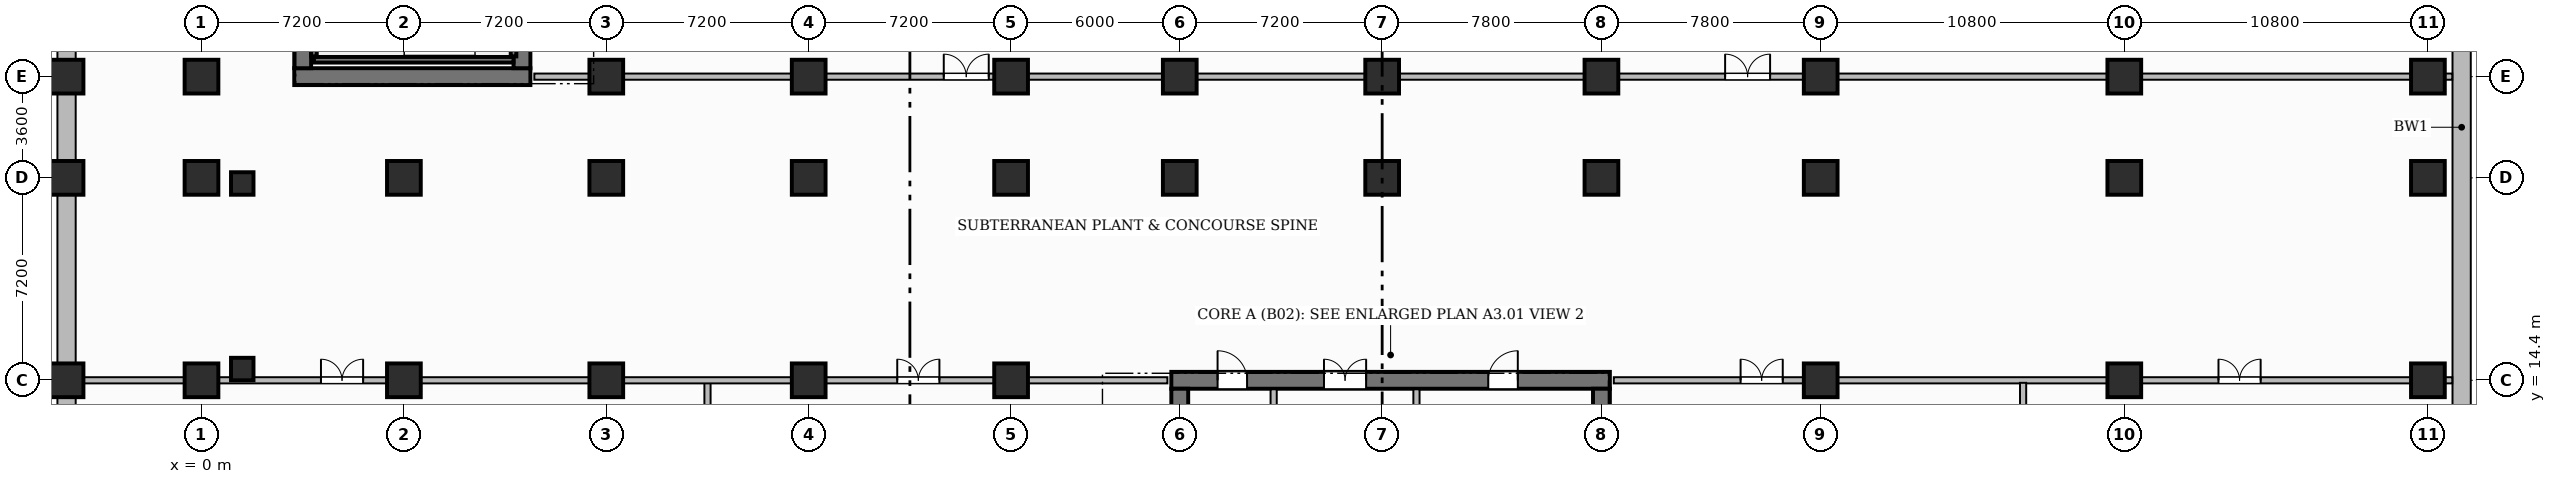
"""IFC4 building model, lengths in metres.
Left out: names, types, materials, properties, quantities, classifications, styles, units other than length and angle.
Written with IfcOpenShell. Run it as: python <this file> out.ifc"""

import sys

from ifc_helpers import new_model, si_unit, direction, frame, frame_2d, origin, origin_2d, place, context, subcontext, project, spatial, rectangle, extrude, source, transform, mapped, element, fill, save


model = new_model("IFC4")
c1 = context("Model", 3, precision=1e-05, world=origin(), true_north=direction((0.0, 1.0)))
c2 = subcontext(c1, "Body", "Model", "MODEL_VIEW")
j1 = project(units=[si_unit("LENGTHUNIT", "METRE"), si_unit("PLANEANGLEUNIT", "RADIAN")], contexts=[c1])
p1 = place(None, origin())
s1 = spatial("IfcSite", under=j1, at=p1, CompositionType="ELEMENT")
p2 = place(p1, origin())
s2 = spatial("IfcBuilding", under=s1, at=p2, CompositionType="ELEMENT")
p3 = place(p2, frame((0.0, 0.0, -13.0)))
s3 = spatial("IfcBuildingStorey", under=s2, at=p3, CompositionType="ELEMENT", Elevation=-13.0)
for number, where, z_axis, x_axis in (
    (1, (80.4, 0.35, -0.4), (0.0, 0.0, 1.0), (0.0, 1.0, 0.0)),
    (2, (-4.8, 46.45, -0.4), (0.0, 0.0, 1.0), (0.0, -1.0, 0.0)),
):
    element("IfcWall", number, at=place(p3, frame(where, z_axis=z_axis, x_axis=x_axis)), inside=s3, PredefinedType="USERDEFINED", context=c2, shape_type="SweptSolid", body=[
        extrude(rectangle(XDim=46.1, YDim=0.65, at=frame_2d((23.05, 0.0))), origin(), (0.0, 0.0, 1.0), 6.9),
    ])
p4 = place(p3, frame((34.5, 14.4, -0.4), z_axis=(0.0, 0.0, 1.0), x_axis=(1.0, 0.0, 0.0)))
e3 = element("IfcWall", 3, at=p4, inside=s3, PredefinedType="SHEAR", context=c2, shape_type="SweptSolid", body=[
    extrude(rectangle(XDim=15.6, YDim=0.6, at=frame_2d((7.8, 0.0))), origin(), (0.0, 0.0, 1.0), 6.9),
])
p5 = place(p4, frame((5.43, 0.0, 0.4)))
e4 = element("IfcOpeningElement", 4, at=p5, cuts=e3, PredefinedType="OPENING", context=c2, shape_type="SweptSolid", body=[
    extrude(rectangle(XDim=1.5, YDim=2.2, at=frame_2d((0.75, 1.1))), frame((0.0, 0.31, 0.0), z_axis=(0.0, -1.0, 0.0), x_axis=(1.0, 0.0, 0.0)), (0.0, 0.0, 1.0), 0.62),
])
p6 = place(p4, frame((1.645, 0.0, 0.4)))
e5 = element("IfcOpeningElement", 5, at=p6, cuts=e3, PredefinedType="OPENING", context=c2, shape_type="SweptSolid", body=[
    extrude(rectangle(XDim=1.05, YDim=2.15, at=frame_2d((0.525, 1.075))), frame((0.0, 0.31, 0.0), z_axis=(0.0, -1.0, 0.0), x_axis=(1.0, 0.0, 0.0)), (0.0, 0.0, 1.0), 0.62),
])
p7 = place(p4, frame((11.275, 0.0, 0.4)))
e6 = element("IfcOpeningElement", 6, at=p7, cuts=e3, PredefinedType="OPENING", context=c2, shape_type="SweptSolid", body=[
    extrude(rectangle(XDim=1.05, YDim=2.15, at=frame_2d((0.525, 1.075))), frame((0.0, 0.31, 0.0), z_axis=(0.0, -1.0, 0.0), x_axis=(1.0, 0.0, 0.0)), (0.0, 0.0, 1.0), 0.62),
])
for number, where, z_axis, x_axis in (
    (7, (34.8, 3.9, -0.4), (0.0, 0.0, 1.0), (0.0, 1.0, 0.0)),
    (8, (49.8, 3.9, -0.4), (0.0, 0.0, 1.0), (0.0, 1.0, 0.0)),
):
    element("IfcWall", number, at=place(p3, frame(where, z_axis=z_axis, x_axis=x_axis)), inside=s3, PredefinedType="SHEAR", context=c2, shape_type="SweptSolid", body=[
        extrude(rectangle(XDim=10.2, YDim=0.6, at=frame_2d((5.1, 0.0))), origin(), (0.0, 0.0, 1.0), 6.9),
    ])
p8 = place(p3, frame((3.3, 25.2, -0.4), z_axis=(0.0, 0.0, 1.0), x_axis=(1.0, 0.0, 0.0)))
e9 = element("IfcWall", 9, at=p8, inside=s3, PredefinedType="SHEAR", context=c2, shape_type="SweptSolid", body=[
    extrude(rectangle(XDim=8.4, YDim=0.6, at=frame_2d((4.2, 0.0))), origin(), (0.0, 0.0, 1.0), 6.9),
])
p9 = place(p3, frame((3.6, 25.5, -0.4), z_axis=(0.0, 0.0, 1.0), x_axis=(0.0, 1.0, 0.0)))
e10 = element("IfcWall", 10, at=p9, inside=s3, PredefinedType="SHEAR", context=c2, shape_type="SweptSolid", body=[
    extrude(rectangle(XDim=13.8, YDim=0.6, at=frame_2d((6.9, 0.0))), origin(), (0.0, 0.0, 1.0), 6.9),
])
p10 = place(p3, frame((11.4, 25.5, -0.4), z_axis=(0.0, 0.0, 1.0), x_axis=(0.0, 1.0, 0.0)))
e11 = element("IfcWall", 11, at=p10, inside=s3, PredefinedType="SHEAR", context=c2, shape_type="SweptSolid", body=[
    extrude(rectangle(XDim=13.8, YDim=0.6, at=frame_2d((6.9, 0.0))), origin(), (0.0, 0.0, 1.0), 6.9),
])
p11 = place(p10, frame((6.47, 0.0, 0.4)))
e12 = element("IfcOpeningElement", 12, at=p11, cuts=e11, PredefinedType="OPENING", context=c2, shape_type="SweptSolid", body=[
    extrude(rectangle(XDim=1.5, YDim=2.2, at=frame_2d((0.75, 1.1))), frame((0.0, 0.31, 0.0), z_axis=(0.0, -1.0, 0.0), x_axis=(1.0, 0.0, 0.0)), (0.0, 0.0, 1.0), 0.62),
])
m1 = source(origin(), c2, "Body", "SweptSolid", [
    extrude(rectangle(XDim=1.2, YDim=1.2, at=origin_2d()), origin(), (0.0, 0.0, 1.0), 6.9),
])
for number, where, z_axis, x_axis in (
    (13, (-4.8, 14.4, -0.4), (0.0, 0.0, 1.0), (1.0, 0.0, 0.0)),
    (14, (-4.8, 21.6, -0.4), (0.0, 0.0, 1.0), (1.0, 0.0, 0.0)),
    (15, (-4.8, 25.2, -0.4), (0.0, 0.0, 1.0), (1.0, 0.0, 0.0)),
    (16, (0.0, 14.4, -0.4), (0.0, 0.0, 1.0), (1.0, 0.0, 0.0)),
    (17, (0.0, 21.6, -0.4), (0.0, 0.0, 1.0), (1.0, 0.0, 0.0)),
    (18, (0.0, 25.2, -0.4), (0.0, 0.0, 1.0), (1.0, 0.0, 0.0)),
    (19, (7.2, 14.4, -0.4), (0.0, 0.0, 1.0), (1.0, 0.0, 0.0)),
    (20, (7.2, 21.6, -0.4), (0.0, 0.0, 1.0), (1.0, 0.0, 0.0)),
    (21, (14.4, 14.4, -0.4), (0.0, 0.0, 1.0), (1.0, 0.0, 0.0)),
    (22, (14.4, 21.6, -0.4), (0.0, 0.0, 1.0), (1.0, 0.0, 0.0)),
    (23, (14.4, 25.2, -0.4), (0.0, 0.0, 1.0), (1.0, 0.0, 0.0)),
    (24, (21.6, 14.4, -0.4), (0.0, 0.0, 1.0), (1.0, 0.0, 0.0)),
    (25, (21.6, 21.6, -0.4), (0.0, 0.0, 1.0), (1.0, 0.0, 0.0)),
    (26, (21.6, 25.2, -0.4), (0.0, 0.0, 1.0), (1.0, 0.0, 0.0)),
    (27, (28.8, 14.4, -0.4), (0.0, 0.0, 1.0), (1.0, 0.0, 0.0)),
    (28, (28.8, 21.6, -0.4), (0.0, 0.0, 1.0), (1.0, 0.0, 0.0)),
    (29, (28.8, 25.2, -0.4), (0.0, 0.0, 1.0), (1.0, 0.0, 0.0)),
    (30, (34.8, 21.6, -0.4), (0.0, 0.0, 1.0), (1.0, 0.0, 0.0)),
    (31, (34.8, 25.2, -0.4), (0.0, 0.0, 1.0), (1.0, 0.0, 0.0)),
    (32, (42.0, 21.6, -0.4), (0.0, 0.0, 1.0), (1.0, 0.0, 0.0)),
    (33, (42.0, 25.2, -0.4), (0.0, 0.0, 1.0), (1.0, 0.0, 0.0)),
    (34, (49.8, 21.6, -0.4), (0.0, 0.0, 1.0), (1.0, 0.0, 0.0)),
    (35, (49.8, 25.2, -0.4), (0.0, 0.0, 1.0), (1.0, 0.0, 0.0)),
    (36, (57.6, 14.4, -0.4), (0.0, 0.0, 1.0), (1.0, 0.0, 0.0)),
    (37, (57.6, 21.6, -0.4), (0.0, 0.0, 1.0), (1.0, 0.0, 0.0)),
    (38, (57.6, 25.2, -0.4), (0.0, 0.0, 1.0), (1.0, 0.0, 0.0)),
    (39, (68.4, 14.4, -0.4), (0.0, 0.0, 1.0), (1.0, 0.0, 0.0)),
    (40, (68.4, 21.6, -0.4), (0.0, 0.0, 1.0), (1.0, 0.0, 0.0)),
    (41, (68.4, 25.2, -0.4), (0.0, 0.0, 1.0), (1.0, 0.0, 0.0)),
    (42, (79.2, 14.4, -0.4), (0.0, 0.0, 1.0), (1.0, 0.0, 0.0)),
    (43, (79.2, 21.6, -0.4), (0.0, 0.0, 1.0), (1.0, 0.0, 0.0)),
    (44, (79.2, 25.2, -0.4), (0.0, 0.0, 1.0), (1.0, 0.0, 0.0)),
):
    element("IfcColumn", number, at=place(p3, frame(where, z_axis=z_axis, x_axis=x_axis)), inside=s3, PredefinedType="COLUMN", context=c2, shape_type="MappedRepresentation", body=[
        mapped(m1, transform((0.0, 0.0, 0.0), scale=1.0)),
    ])
m2 = source(origin(), c2, "Body", "SweptSolid", [
    extrude(rectangle(XDim=0.8, YDim=0.8, at=origin_2d()), origin(), (0.0, 0.0, 1.0), 6.9),
])
for number, where, z_axis, x_axis in (
    (45, (1.45, 14.8, -0.4), (0.0, 0.0, 1.0), (1.0, 0.0, 0.0)),
    (46, (1.45, 21.4, -0.4), (0.0, 0.0, 1.0), (1.0, 0.0, 0.0)),
):
    element("IfcColumn", number, at=place(p3, frame(where, z_axis=z_axis, x_axis=x_axis)), inside=s3, PredefinedType="COLUMN", context=c2, shape_type="MappedRepresentation", body=[
        mapped(m2, transform((0.0, 0.0, 0.0), scale=1.0)),
    ])
p12 = place(p3, frame((38.14, 11.22, 0.0), z_axis=(0.0, 0.0, 1.0), x_axis=(0.0, 1.0, 0.0)))
e47 = element("IfcWall", 47, at=p12, inside=s3, PredefinedType="PARTITIONING", context=c2, shape_type="SweptSolid", body=[
    extrude(rectangle(XDim=2.86, YDim=0.22, at=frame_2d((1.43, 0.0))), origin(), (0.0, 0.0, 1.0), 6.1),
])
p13 = place(p12, frame((0.905, 0.0, 0.0)))
e48 = element("IfcOpeningElement", 48, at=p13, cuts=e47, PredefinedType="OPENING", context=c2, shape_type="SweptSolid", body=[
    extrude(rectangle(XDim=1.05, YDim=2.15, at=frame_2d((0.525, 1.075))), frame((0.0, 0.12, 0.0), z_axis=(0.0, -1.0, 0.0), x_axis=(1.0, 0.0, 0.0)), (0.0, 0.0, 1.0), 0.24),
])
p14 = place(p3, frame((43.22, 11.22, 0.0), z_axis=(0.0, 0.0, 1.0), x_axis=(0.0, 1.0, 0.0)))
e49 = element("IfcWall", 49, at=p14, inside=s3, PredefinedType="PARTITIONING", context=c2, shape_type="SweptSolid", body=[
    extrude(rectangle(XDim=2.86, YDim=0.22, at=frame_2d((1.43, 0.0))), origin(), (0.0, 0.0, 1.0), 6.1),
])
p15 = place(p14, frame((0.905, 0.0, 0.0)))
e50 = element("IfcOpeningElement", 50, at=p15, cuts=e49, PredefinedType="OPENING", context=c2, shape_type="SweptSolid", body=[
    extrude(rectangle(XDim=1.05, YDim=2.15, at=frame_2d((0.525, 1.075))), frame((0.0, 0.12, 0.0), z_axis=(0.0, -1.0, 0.0), x_axis=(1.0, 0.0, 0.0)), (0.0, 0.0, 1.0), 0.24),
])
p16 = place(p3, frame((4.0, 25.8, -0.4), z_axis=(0.0, 0.0, 1.0), x_axis=(1.0, 0.0, 0.0)))
e51 = element("IfcWall", 51, at=p16, inside=s3, PredefinedType="SHEAR", context=c2, shape_type="SweptSolid", body=[
    extrude(rectangle(XDim=7.1, YDim=0.2, at=frame_2d((3.55, 0.0))), origin(), (0.0, 0.0, 1.0), 6.9),
])
for number, where, z_axis, x_axis in (
    (52, (4.0, 25.92, -0.4), (0.0, 0.0, 1.0), (0.0, 1.0, 0.0)),
    (53, (11.1, 25.92, -0.4), (0.0, 0.0, 1.0), (0.0, 1.0, 0.0)),
):
    element("IfcWall", number, at=place(p3, frame(where, z_axis=z_axis, x_axis=x_axis)), inside=s3, PredefinedType="SHEAR", context=c2, shape_type="SweptSolid", body=[
        extrude(rectangle(XDim=2.7, YDim=0.2, at=frame_2d((1.35, 0.0))), origin(), (0.0, 0.0, 1.0), 6.9),
    ])
p17 = place(p3, frame((11.84, 25.2, 0.0), z_axis=(0.0, 0.0, 1.0), x_axis=(1.0, 0.0, 0.0)))
e54 = element("IfcWall", 54, at=p17, inside=s3, PredefinedType="PARTITIONING", context=c2, shape_type="SweptSolid", body=[
    extrude(rectangle(XDim=68.227, YDim=0.22, at=frame_2d((34.113, 0.0))), origin(), (0.0, 0.0, 1.0), 5.185),
])
p18 = place(p17, frame((14.565, 0.0, 0.0)))
e55 = element("IfcOpeningElement", 55, at=p18, cuts=e54, PredefinedType="OPENING", context=c2, shape_type="SweptSolid", body=[
    extrude(rectangle(XDim=1.6, YDim=2.4, at=frame_2d((0.8, 1.2))), frame((0.0, 0.12, 0.0), z_axis=(0.0, -1.0, 0.0), x_axis=(1.0, 0.0, 0.0)), (0.0, 0.0, 1.0), 0.24),
])
p19 = place(p17, frame((42.36, 0.0, 0.0)))
e56 = element("IfcOpeningElement", 56, at=p19, cuts=e54, PredefinedType="OPENING", context=c2, shape_type="SweptSolid", body=[
    extrude(rectangle(XDim=1.6, YDim=2.4, at=frame_2d((0.8, 1.2))), frame((0.0, 0.12, 0.0), z_axis=(0.0, -1.0, 0.0), x_axis=(1.0, 0.0, 0.0)), (0.0, 0.0, 1.0), 0.24),
])
p20 = place(p3, frame((18.0, 0.333, 0.0), z_axis=(0.0, 0.0, 1.0), x_axis=(0.0, 1.0, 0.0)))
e57 = element("IfcWall", 57, at=p20, inside=s3, PredefinedType="PARTITIONING", context=c2, shape_type="SweptSolid", body=[
    extrude(rectangle(XDim=13.977, YDim=0.22, at=frame_2d((6.989, 0.0))), origin(), (0.0, 0.0, 1.0), 5.335),
])
p21 = place(p20, frame((1.342, 0.0, 0.0)))
e58 = element("IfcOpeningElement", 58, at=p21, cuts=e57, PredefinedType="OPENING", context=c2, shape_type="SweptSolid", body=[
    extrude(rectangle(XDim=1.05, YDim=2.15, at=frame_2d((0.525, 1.075))), frame((0.0, 0.12, 0.0), z_axis=(0.0, -1.0, 0.0), x_axis=(1.0, 0.0, 0.0)), (0.0, 0.0, 1.0), 0.24),
])
p22 = place(p3, frame((-4.31, 14.4, 0.0), z_axis=(0.0, 0.0, 1.0), x_axis=(1.0, 0.0, 0.0)))
e59 = element("IfcWall", 59, at=p22, inside=s3, PredefinedType="PARTITIONING", context=c2, shape_type="SweptSolid", body=[
    extrude(rectangle(XDim=38.67, YDim=0.22, at=frame_2d((19.335, 0.0))), origin(), (0.0, 0.0, 1.0), 5.185),
])
p23 = place(p22, frame((8.56, 0.0, 0.0)))
e60 = element("IfcOpeningElement", 60, at=p23, cuts=e59, PredefinedType="OPENING", context=c2, shape_type="SweptSolid", body=[
    extrude(rectangle(XDim=1.5, YDim=2.2, at=frame_2d((0.75, 1.1))), frame((0.0, 0.12, 0.0), z_axis=(0.0, -1.0, 0.0), x_axis=(1.0, 0.0, 0.0)), (0.0, 0.0, 1.0), 0.24),
])
p24 = place(p22, frame((29.06, 0.0, 0.0)))
e61 = element("IfcOpeningElement", 61, at=p24, cuts=e59, PredefinedType="OPENING", context=c2, shape_type="SweptSolid", body=[
    extrude(rectangle(XDim=1.5, YDim=2.2, at=frame_2d((0.75, 1.1))), frame((0.0, 0.12, 0.0), z_axis=(0.0, -1.0, 0.0), x_axis=(1.0, 0.0, 0.0)), (0.0, 0.0, 1.0), 0.24),
])
p25 = place(p3, frame((50.24, 14.4, 0.0), z_axis=(0.0, 0.0, 1.0), x_axis=(1.0, 0.0, 0.0)))
e62 = element("IfcWall", 62, at=p25, inside=s3, PredefinedType="PARTITIONING", context=c2, shape_type="SweptSolid", body=[
    extrude(rectangle(XDim=29.827, YDim=0.22, at=frame_2d((14.914, 0.0))), origin(), (0.0, 0.0, 1.0), 5.185),
])
p26 = place(p25, frame((4.51, 0.0, 0.0)))
e63 = element("IfcOpeningElement", 63, at=p26, cuts=e62, PredefinedType="OPENING", context=c2, shape_type="SweptSolid", body=[
    extrude(rectangle(XDim=1.5, YDim=2.2, at=frame_2d((0.75, 1.1))), frame((0.0, 0.12, 0.0), z_axis=(0.0, -1.0, 0.0), x_axis=(1.0, 0.0, 0.0)), (0.0, 0.0, 1.0), 0.24),
])
p27 = place(p25, frame((21.51, 0.0, 0.0)))
e64 = element("IfcOpeningElement", 64, at=p27, cuts=e62, PredefinedType="OPENING", context=c2, shape_type="SweptSolid", body=[
    extrude(rectangle(XDim=1.5, YDim=2.2, at=frame_2d((0.75, 1.1))), frame((0.0, 0.12, 0.0), z_axis=(0.0, -1.0, 0.0), x_axis=(1.0, 0.0, 0.0)), (0.0, 0.0, 1.0), 0.24),
])
p28 = place(p3, frame((64.8, 0.333, 0.0), z_axis=(0.0, 0.0, 1.0), x_axis=(0.0, 1.0, 0.0)))
e65 = element("IfcWall", 65, at=p28, inside=s3, PredefinedType="PARTITIONING", context=c2, shape_type="SweptSolid", body=[
    extrude(rectangle(XDim=13.977, YDim=0.22, at=frame_2d((6.989, 0.0))), origin(), (0.0, 0.0, 1.0), 6.1),
])
m3 = source(origin(), c2, "Body", "SweptSolid", [
    extrude(rectangle(XDim=1.5, YDim=2.2, at=frame_2d((0.75, 1.1))), frame((0.0, 0.025, 0.0), z_axis=(0.0, -1.0, 0.0), x_axis=(1.0, 0.0, 0.0)), (0.0, 0.0, 1.0), 0.05),
])
p29 = place(p5, origin())
e66 = element("IfcDoor", 66, at=p29, inside=s3, OperationType="DOUBLE_DOOR_SINGLE_SWING", PredefinedType="DOOR", context=c2, shape_type="MappedRepresentation", body=[
    mapped(m3, transform((0.0, 0.0, 0.0), scale=1.0)),
])
fill(e4, e66)
m4 = source(origin(), c2, "Body", "SweptSolid", [
    extrude(rectangle(XDim=1.05, YDim=2.15, at=frame_2d((0.525, 1.075))), frame((0.0, 0.025, 0.0), z_axis=(0.0, -1.0, 0.0), x_axis=(1.0, 0.0, 0.0)), (0.0, 0.0, 1.0), 0.05),
])
p30 = place(p6, origin())
e67 = element("IfcDoor", 67, at=p30, inside=s3, OperationType="SINGLE_SWING_LEFT", PredefinedType="DOOR", context=c2, shape_type="MappedRepresentation", body=[
    mapped(m4, transform((0.0, 0.0, 0.0), scale=1.0)),
])
fill(e5, e67)
p31 = place(p7, origin())
e68 = element("IfcDoor", 68, at=p31, inside=s3, OperationType="SINGLE_SWING_RIGHT", PredefinedType="DOOR", context=c2, shape_type="MappedRepresentation", body=[
    mapped(m4, transform((0.0, 0.0, 0.0), scale=1.0)),
])
fill(e6, e68)
m5 = source(origin(), c2, "Body", "SweptSolid", [
    extrude(rectangle(XDim=1.6, YDim=2.4, at=frame_2d((0.8, 1.2))), frame((0.0, 0.025, 0.0), z_axis=(0.0, -1.0, 0.0), x_axis=(1.0, 0.0, 0.0)), (0.0, 0.0, 1.0), 0.05),
])
p32 = place(p18, origin())
e69 = element("IfcDoor", 69, at=p32, inside=s3, OperationType="DOUBLE_DOOR_SINGLE_SWING", PredefinedType="DOOR", context=c2, shape_type="MappedRepresentation", body=[
    mapped(m5, transform((0.0, 0.0, 0.0), scale=1.0)),
])
fill(e55, e69)
p33 = place(p19, origin())
e70 = element("IfcDoor", 70, at=p33, inside=s3, OperationType="DOUBLE_DOOR_SINGLE_SWING", PredefinedType="DOOR", context=c2, shape_type="MappedRepresentation", body=[
    mapped(m5, transform((0.0, 0.0, 0.0), scale=1.0)),
])
fill(e56, e70)
p34 = place(p23, origin())
e71 = element("IfcDoor", 71, at=p34, inside=s3, OperationType="DOUBLE_DOOR_SINGLE_SWING", PredefinedType="DOOR", context=c2, shape_type="MappedRepresentation", body=[
    mapped(m3, transform((0.0, 0.0, 0.0), scale=1.0)),
])
fill(e60, e71)
p35 = place(p24, origin())
e72 = element("IfcDoor", 72, at=p35, inside=s3, OperationType="DOUBLE_DOOR_SINGLE_SWING", PredefinedType="DOOR", context=c2, shape_type="MappedRepresentation", body=[
    mapped(m3, transform((0.0, 0.0, 0.0), scale=1.0)),
])
fill(e61, e72)
p36 = place(p26, origin())
e73 = element("IfcDoor", 73, at=p36, inside=s3, OperationType="DOUBLE_DOOR_SINGLE_SWING", PredefinedType="DOOR", context=c2, shape_type="MappedRepresentation", body=[
    mapped(m3, transform((0.0, 0.0, 0.0), scale=1.0)),
])
fill(e63, e73)
p37 = place(p27, origin())
e74 = element("IfcDoor", 74, at=p37, inside=s3, OperationType="DOUBLE_DOOR_SINGLE_SWING", PredefinedType="DOOR", context=c2, shape_type="MappedRepresentation", body=[
    mapped(m3, transform((0.0, 0.0, 0.0), scale=1.0)),
])
fill(e64, e74)
save(model, sys.argv[1])
